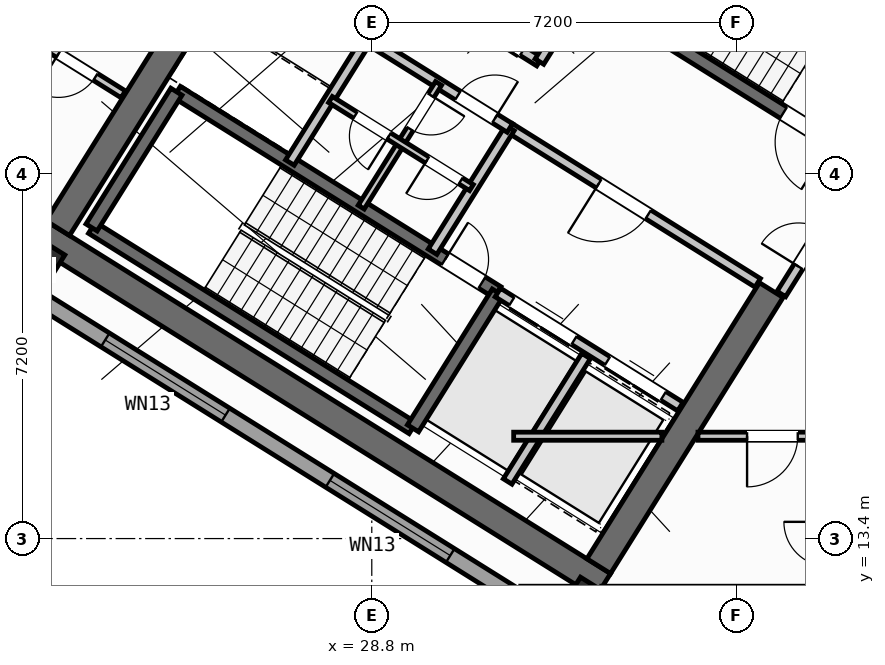
"""IFC4 building model, lengths in metres.
Left out: names, types, materials, properties, quantities, classifications, styles, units other than length and angle.
Written with IfcOpenShell. Run it as: python <this file> out.ifc"""

import sys

from ifc_helpers import new_model, si_unit, direction, frame, frame_2d, origin, origin_2d, place, context, subcontext, project, spatial, rectangle, hollow_rectangle, extrude, source, transform, mapped, element, fill, save


model = new_model("IFC4")
c1 = context("Model", 3, precision=1e-05, world=origin(), true_north=direction((0.0, 1.0)))
c2 = subcontext(c1, "Body", "Model", "MODEL_VIEW")
j1 = project(units=[si_unit("LENGTHUNIT", "METRE"), si_unit("PLANEANGLEUNIT", "RADIAN")], contexts=[c1])
p1 = place(None, origin())
s1 = spatial("IfcSite", under=j1, at=p1, CompositionType="ELEMENT")
p2 = place(p1, origin())
s2 = spatial("IfcBuilding", under=s1, at=p2, CompositionType="ELEMENT")
p3 = place(p2, frame((0.0, 0.0, 199.5)))
s3 = spatial("IfcBuildingStorey", under=s2, at=p3, CompositionType="ELEMENT", Elevation=199.5)
p4 = place(p3, frame((33.366, 12.477, 0.0), z_axis=(0.0, 0.0, 1.0), x_axis=(-0.848047359947, 0.529920442413, 0.0)))
e1 = element("IfcWall", 1, at=p4, inside=s3, PredefinedType="SHEAR", context=c2, shape_type="SweptSolid", body=[
    extrude(rectangle(XDim=13.14, YDim=0.55, at=frame_2d((6.57, 0.0))), origin(), (0.0, 0.0, 1.0), 4.25),
])
p5 = place(p3, frame((36.683, 18.304, 0.0), z_axis=(0.0, 0.0, 1.0), x_axis=(-0.529896466841, -0.848062341122, 0.0)))
e2 = element("IfcWall", 2, at=p5, inside=s3, PredefinedType="SHEAR", context=c2, shape_type="SweptSolid", body=[
    extrude(rectangle(XDim=6.425, YDim=0.55, at=frame_2d((3.212, 0.0))), origin(), (0.0, 0.0, 1.0), 4.25),
])
p6 = place(p3, frame((26.007, 24.976, 0.0), z_axis=(0.0, 0.0, 1.0), x_axis=(-0.529923795287, -0.848045264823, 0.0)))
e3 = element("IfcWall", 3, at=p6, inside=s3, PredefinedType="SHEAR", context=c2, shape_type="SweptSolid", body=[
    extrude(rectangle(XDim=6.425, YDim=0.55, at=frame_2d((3.212, 0.0))), origin(), (0.0, 0.0, 1.0), 4.25),
])
m1 = source(origin(), c2, "Body", "SweptSolid", [
    extrude(hollow_rectangle(XDim=0.8, YDim=0.8, WallThickness=0.032, at=origin_2d()), origin(), (0.0, 0.0, 1.0), 4.5),
])
for number, where, z_axis, x_axis in (
    (4, (33.046, 12.087, 0.0), (0.0, 0.0, 1.0), (-0.848, 0.53, 0.0)),
    (5, (22.191, 18.87, 0.0), (0.0, 0.0, 1.0), (-0.848, 0.53, 0.0)),
):
    element("IfcColumn", number, at=place(p3, frame(where, z_axis=z_axis, x_axis=x_axis)), inside=s3, PredefinedType="COLUMN", context=c2, shape_type="MappedRepresentation", body=[
        mapped(m1, transform((0.0, 0.0, 0.0), scale=1.0)),
    ])
p7 = place(p3, frame((31.76, 12.183, 0.0), z_axis=(0.0, 0.0, 1.0), x_axis=(-0.848047074256, 0.529920899612, 0.0)))
e6 = element("IfcWall", 6, at=p7, inside=s3, PredefinedType="STANDARD", context=c2, shape_type="SweptSolid", body=[
    extrude(rectangle(XDim=30.652, YDim=0.32, at=frame_2d((15.326, 0.0))), origin(), (0.0, 0.0, 1.0), 4.25),
])
p8 = place(p7, frame((15.166, 0.0, 0.0)))
e7 = element("IfcOpeningElement", 7, at=p8, cuts=e6, PredefinedType="OPENING", context=c2, shape_type="SweptSolid", body=[
    extrude(rectangle(XDim=1.2, YDim=2.15, at=frame_2d((0.6, 1.075))), frame((0.0, 0.17, 0.0), z_axis=(0.0, -1.0, 0.0), x_axis=(1.0, 0.0, 0.0)), (0.0, 0.0, 1.0), 0.34),
])
p9 = place(p7, frame((1.665, 0.0, 0.65)))
e8 = element("IfcOpeningElement", 8, at=p9, cuts=e6, PredefinedType="OPENING", context=c2, shape_type="SweptSolid", body=[
    extrude(rectangle(XDim=2.8, YDim=2.1, at=frame_2d((1.4, 1.05))), frame((0.0, 0.17, 0.0), z_axis=(0.0, -1.0, 0.0), x_axis=(1.0, 0.0, 0.0)), (0.0, 0.0, 1.0), 0.34),
])
p10 = place(p7, frame((6.894, 0.0, 0.65)))
e9 = element("IfcOpeningElement", 9, at=p10, cuts=e6, PredefinedType="OPENING", context=c2, shape_type="SweptSolid", body=[
    extrude(rectangle(XDim=2.8, YDim=2.1, at=frame_2d((1.4, 1.05))), frame((0.0, 0.17, 0.0), z_axis=(0.0, -1.0, 0.0), x_axis=(1.0, 0.0, 0.0)), (0.0, 0.0, 1.0), 0.34),
])
p11 = place(p7, frame((20.453, 0.0, 0.85)))
e10 = element("IfcOpeningElement", 10, at=p11, cuts=e6, PredefinedType="OPENING", context=c2, shape_type="SweptSolid", body=[
    extrude(rectangle(XDim=1.5, YDim=1.5, at=frame_2d((0.75, 0.75))), frame((0.0, 0.17, 0.0), z_axis=(0.0, -1.0, 0.0), x_axis=(1.0, 0.0, 0.0)), (0.0, 0.0, 1.0), 0.34),
])
p12 = place(p7, frame((26.258, 0.0, 0.65)))
e11 = element("IfcOpeningElement", 11, at=p12, cuts=e6, PredefinedType="OPENING", context=c2, shape_type="SweptSolid", body=[
    extrude(rectangle(XDim=2.8, YDim=2.1, at=frame_2d((1.4, 1.05))), frame((0.0, 0.17, 0.0), z_axis=(0.0, -1.0, 0.0), x_axis=(1.0, 0.0, 0.0)), (0.0, 0.0, 1.0), 0.34),
])
p13 = place(p3, frame((29.605, 15.581, 0.0), z_axis=(0.0, 0.0, 1.0), x_axis=(-0.848036911448, 0.529937163087, 0.0)))
e12 = element("IfcWall", 12, at=p13, inside=s3, PredefinedType="SHEAR", context=c2, shape_type="SweptSolid", body=[
    extrude(rectangle(XDim=7.46, YDim=0.26, at=frame_2d((3.73, 0.0))), origin(), (0.0, 0.0, 1.0), 4.25),
])
p14 = place(p3, frame((31.28, 18.261, 0.0), z_axis=(0.0, 0.0, 1.0), x_axis=(-0.848051618787, 0.529913626805, 0.0)))
e13 = element("IfcWall", 13, at=p14, inside=s3, PredefinedType="SHEAR", context=c2, shape_type="SweptSolid", body=[
    extrude(rectangle(XDim=7.46, YDim=0.26, at=frame_2d((3.73, 0.0))), origin(), (0.0, 0.0, 1.0), 4.25),
])
p15 = place(p14, frame((0.36, 0.0, 0.0)))
e14 = element("IfcOpeningElement", 14, at=p15, cuts=e13, PredefinedType="OPENING", context=c2, shape_type="SweptSolid", body=[
    extrude(rectangle(XDim=0.86, YDim=2.05, at=frame_2d((0.43, 1.025))), frame((0.0, 0.14, 0.0), z_axis=(0.0, -1.0, 0.0), x_axis=(1.0, 0.0, 0.0)), (0.0, 0.0, 1.0), 0.28),
])
p16 = place(p3, frame((31.288, 18.256, 0.0), z_axis=(0.0, 0.0, 1.0), x_axis=(-0.529943379326, -0.848033026897, 0.0)))
e15 = element("IfcWall", 15, at=p16, inside=s3, PredefinedType="SHEAR", context=c2, shape_type="SweptSolid", body=[
    extrude(rectangle(XDim=3.16, YDim=0.26, at=frame_2d((1.58, 0.0))), origin(), (0.0, 0.0, 1.0), 4.25),
])
p17 = place(p3, frame((24.945, 22.22, 0.0), z_axis=(0.0, 0.0, 1.0), x_axis=(-0.529908658664, -0.84805472316, 0.0)))
e16 = element("IfcWall", 16, at=p17, inside=s3, PredefinedType="SHEAR", context=c2, shape_type="SweptSolid", body=[
    extrude(rectangle(XDim=3.16, YDim=0.26, at=frame_2d((1.58, 0.0))), origin(), (0.0, 0.0, 1.0), 4.25),
])
p18 = place(p3, frame((38.046, 21.108, 0.0), z_axis=(0.0, 0.0, 1.0), x_axis=(-0.848054434086, 0.529909121291, 0.0)))
e17 = element("IfcWall", 17, at=p18, inside=s3, PredefinedType="SHEAR", context=c2, shape_type="SweptSolid", body=[
    extrude(rectangle(XDim=7.33, YDim=0.26, at=frame_2d((3.665, 0.0))), origin(), (0.0, 0.0, 1.0), 4.25),
])
p19 = place(p18, frame((0.22, 0.0, 0.0)))
e18 = element("IfcOpeningElement", 18, at=p19, cuts=e17, PredefinedType="OPENING", context=c2, shape_type="SweptSolid", body=[
    extrude(rectangle(XDim=1.1, YDim=2.1, at=frame_2d((0.55, 1.05))), frame((0.0, 0.14, 0.0), z_axis=(0.0, -1.0, 0.0), x_axis=(1.0, 0.0, 0.0)), (0.0, 0.0, 1.0), 0.28),
])
p20 = place(p3, frame((34.891, 16.005, 0.0), z_axis=(0.0, 0.0, 1.0), x_axis=(-0.848062873452, 0.529895614884, 0.0)))
e19 = element("IfcWall", 19, at=p20, inside=s3, PredefinedType="STANDARD", context=c2, shape_type="SweptSolid", body=[
    extrude(rectangle(XDim=4.248, YDim=0.2, at=frame_2d((2.124, 0.0))), origin(), (0.0, 0.0, 1.0), 4.24),
])
p21 = place(p20, frame((0.398, 0.0, 0.0)))
e20 = element("IfcOpeningElement", 20, at=p21, cuts=e19, PredefinedType="OPENING", context=c2, shape_type="SweptSolid", body=[
    extrude(rectangle(XDim=1.3, YDim=2.2, at=frame_2d((0.65, 1.1))), frame((0.0, 0.11, 0.0), z_axis=(0.0, -1.0, 0.0), x_axis=(1.0, 0.0, 0.0)), (0.0, 0.0, 1.0), 0.22),
])
p22 = place(p20, frame((2.473, 0.0, 0.0)))
e21 = element("IfcOpeningElement", 21, at=p22, cuts=e19, PredefinedType="OPENING", context=c2, shape_type="SweptSolid", body=[
    extrude(rectangle(XDim=1.45, YDim=2.25, at=frame_2d((0.725, 1.125))), frame((0.0, 0.11, 0.0), z_axis=(0.0, -1.0, 0.0), x_axis=(1.0, 0.0, 0.0)), (0.0, 0.0, 1.0), 0.22),
])
p23 = place(p3, frame((36.417, 18.447, 0.0), z_axis=(0.0, 0.0, 1.0), x_axis=(-0.848064879198, 0.529892404805, 0.0)))
e22 = element("IfcWall", 22, at=p23, inside=s3, PredefinedType="STANDARD", context=c2, shape_type="SweptSolid", body=[
    extrude(rectangle(XDim=5.768, YDim=0.2, at=frame_2d((2.884, 0.0))), origin(), (0.0, 0.0, 1.0), 4.24),
])
p24 = place(p23, frame((2.548, 0.0, 0.0)))
e23 = element("IfcOpeningElement", 23, at=p24, cuts=e22, PredefinedType="OPENING", context=c2, shape_type="SweptSolid", body=[
    extrude(rectangle(XDim=1.15, YDim=2.1, at=frame_2d((0.575, 1.05))), frame((0.0, 0.11, 0.0), z_axis=(0.0, -1.0, 0.0), x_axis=(1.0, 0.0, 0.0)), (0.0, 0.0, 1.0), 0.22),
])
p25 = place(p3, frame((32.108, 22.814, 0.0), z_axis=(0.0, 0.0, 1.0), x_axis=(-0.848042229521, 0.529928652696, 0.0)))
e24 = element("IfcWall", 24, at=p25, inside=s3, PredefinedType="STANDARD", context=c2, shape_type="SweptSolid", body=[
    extrude(rectangle(XDim=5.62, YDim=0.2, at=frame_2d((2.81, 0.0))), origin(), (0.0, 0.0, 1.0), 4.24),
])
p26 = place(p25, frame((0.39, 0.0, 0.0)))
e25 = element("IfcOpeningElement", 25, at=p26, cuts=e24, PredefinedType="OPENING", context=c2, shape_type="SweptSolid", body=[
    extrude(rectangle(XDim=1.1, YDim=2.15, at=frame_2d((0.55, 1.075))), frame((0.0, 0.11, 0.0), z_axis=(0.0, -1.0, 0.0), x_axis=(1.0, 0.0, 0.0)), (0.0, 0.0, 1.0), 0.22),
])
p27 = place(p25, frame((2.25, 0.0, 0.0)))
e26 = element("IfcOpeningElement", 26, at=p27, cuts=e24, PredefinedType="OPENING", context=c2, shape_type="SweptSolid", body=[
    extrude(rectangle(XDim=1.1, YDim=2.15, at=frame_2d((0.55, 1.075))), frame((0.0, 0.11, 0.0), z_axis=(0.0, -1.0, 0.0), x_axis=(1.0, 0.0, 0.0)), (0.0, 0.0, 1.0), 0.22),
])
p28 = place(p25, frame((4.11, 0.0, 0.0)))
e27 = element("IfcOpeningElement", 27, at=p28, cuts=e24, PredefinedType="OPENING", context=c2, shape_type="SweptSolid", body=[
    extrude(rectangle(XDim=1.1, YDim=2.15, at=frame_2d((0.55, 1.075))), frame((0.0, 0.11, 0.0), z_axis=(0.0, -1.0, 0.0), x_axis=(1.0, 0.0, 0.0)), (0.0, 0.0, 1.0), 0.22),
])
p29 = place(p3, frame((32.982, 24.213, 0.0), z_axis=(0.0, 0.0, 1.0), x_axis=(-0.529839334948, -0.84809803628, 0.0)))
e28 = element("IfcWall", 28, at=p29, inside=s3, PredefinedType="STANDARD", context=c2, shape_type="SweptSolid", body=[
    extrude(rectangle(XDim=1.65, YDim=0.2, at=frame_2d((0.825, 0.0))), origin(), (0.0, 0.0, 1.0), 4.24),
])
p30 = place(p3, frame((33.029, 17.003, 0.0), z_axis=(0.0, 0.0, 1.0), x_axis=(-0.529916267533, -0.848049968695, 0.0)))
e29 = element("IfcWall", 29, at=p30, inside=s3, PredefinedType="STANDARD", context=c2, shape_type="SweptSolid", body=[
    extrude(rectangle(XDim=2.92, YDim=0.2, at=frame_2d((1.46, 0.0))), origin(), (0.0, 0.0, 1.0), 4.24),
])
for number, where, z_axis, x_axis in (
    (30, (31.525, 21.504, 0.0), (0.0, 0.0, 1.0), (-0.53, -0.848, 0.0)),
    (31, (28.71, 23.263, 0.0), (0.0, 0.0, 1.0), (-0.53, -0.848, 0.0)),
):
    element("IfcWall", number, at=place(p3, frame(where, z_axis=z_axis, x_axis=x_axis)), inside=s3, PredefinedType="STANDARD", context=c2, shape_type="SweptSolid", body=[
        extrude(rectangle(XDim=2.88, YDim=0.2, at=frame_2d((1.44, 0.0))), origin(), (0.0, 0.0, 1.0), 4.24),
    ])
p31 = place(p3, frame((31.525, 21.504, 0.0), z_axis=(0.0, 0.0, 1.0), x_axis=(-0.848040211232, 0.529931882541, 0.0)))
e32 = element("IfcWall", 32, at=p31, inside=s3, PredefinedType="STANDARD", context=c2, shape_type="SweptSolid", body=[
    extrude(rectangle(XDim=6.218, YDim=0.2, at=frame_2d((3.109, 0.0))), origin(), (0.0, 0.0, 1.0), 4.24),
])
p32 = place(p31, frame((4.4, 0.0, 0.0)))
e33 = element("IfcOpeningElement", 33, at=p32, cuts=e32, PredefinedType="OPENING", context=c2, shape_type="SweptSolid", body=[
    extrude(rectangle(XDim=0.86, YDim=2.05, at=frame_2d((0.43, 1.025))), frame((0.0, 0.11, 0.0), z_axis=(0.0, -1.0, 0.0), x_axis=(1.0, 0.0, 0.0)), (0.0, 0.0, 1.0), 0.22),
])
p33 = place(p31, frame((0.35, 0.0, 0.0)))
e34 = element("IfcOpeningElement", 34, at=p33, cuts=e32, PredefinedType="OPENING", context=c2, shape_type="SweptSolid", body=[
    extrude(rectangle(XDim=0.86, YDim=2.05, at=frame_2d((0.43, 1.025))), frame((0.0, 0.11, 0.0), z_axis=(0.0, -1.0, 0.0), x_axis=(1.0, 0.0, 0.0)), (0.0, 0.0, 1.0), 0.22),
])
p34 = place(p3, frame((30.117, 22.384, 0.0), z_axis=(0.0, 0.0, 1.0), x_axis=(-0.529951914384, -0.848027693204, 0.0)))
e35 = element("IfcWall", 35, at=p34, inside=s3, PredefinedType="PLUMBINGWALL", context=c2, shape_type="SweptSolid", body=[
    extrude(rectangle(XDim=1.4, YDim=0.14, at=frame_2d((0.7, 0.0))), origin(), (0.0, 0.0, 1.0), 4.24),
])
p35 = place(p34, frame((0.28, 0.0, 0.0)))
e36 = element("IfcOpeningElement", 36, at=p35, cuts=e35, PredefinedType="OPENING", context=c2, shape_type="SweptSolid", body=[
    extrude(rectangle(XDim=0.78, YDim=2.05, at=frame_2d((0.39, 1.025))), frame((0.0, 0.08, 0.0), z_axis=(0.0, -1.0, 0.0), x_axis=(1.0, 0.0, 0.0)), (0.0, 0.0, 1.0), 0.16),
])
p36 = place(p3, frame((29.375, 21.196, 0.0), z_axis=(0.0, 0.0, 1.0), x_axis=(-0.529865479138, -0.848081702443, 0.0)))
e37 = element("IfcWall", 37, at=p36, inside=s3, PredefinedType="PLUMBINGWALL", context=c2, shape_type="SweptSolid", body=[
    extrude(rectangle(XDim=1.48, YDim=0.14, at=frame_2d((0.74, 0.0))), origin(), (0.0, 0.0, 1.0), 4.24),
])
p37 = place(p3, frame((30.766, 20.327, 0.0), z_axis=(0.0, 0.0, 1.0), x_axis=(-0.848052663127, 0.529911955482, 0.0)))
e38 = element("IfcWall", 38, at=p37, inside=s3, PredefinedType="PLUMBINGWALL", context=c2, shape_type="SweptSolid", body=[
    extrude(rectangle(XDim=3.28, YDim=0.14, at=frame_2d((1.64, 0.0))), origin(), (0.0, 0.0, 1.0), 4.24),
])
p38 = place(p37, frame((0.25, 0.0, 0.0)))
e39 = element("IfcOpeningElement", 39, at=p38, cuts=e38, PredefinedType="OPENING", context=c2, shape_type="SweptSolid", body=[
    extrude(rectangle(XDim=0.78, YDim=2.05, at=frame_2d((0.39, 1.025))), frame((0.0, 0.08, 0.0), z_axis=(0.0, -1.0, 0.0), x_axis=(1.0, 0.0, 0.0)), (0.0, 0.0, 1.0), 0.16),
])
p39 = place(p37, frame((1.92, 0.0, 0.0)))
e40 = element("IfcOpeningElement", 40, at=p39, cuts=e38, PredefinedType="OPENING", context=c2, shape_type="SweptSolid", body=[
    extrude(rectangle(XDim=0.78, YDim=2.05, at=frame_2d((0.39, 1.025))), frame((0.0, 0.08, 0.0), z_axis=(0.0, -1.0, 0.0), x_axis=(1.0, 0.0, 0.0)), (0.0, 0.0, 1.0), 0.16),
])
p40 = place(p3, frame((23.896, 22.168, 0.0), z_axis=(0.0, 0.0, 1.0), x_axis=(-0.848075553449, 0.529875320846, 0.0)))
e41 = element("IfcWall", 41, at=p40, inside=s3, PredefinedType="PARTITIONING", context=c2, shape_type="SweptSolid", body=[
    extrude(rectangle(XDim=2.308, YDim=0.16, at=frame_2d((1.154, 0.0))), origin(), (0.0, 0.0, 1.0), 4.24),
])
p41 = place(p40, frame((0.648, 0.0, 0.0)))
e42 = element("IfcOpeningElement", 42, at=p41, cuts=e41, PredefinedType="OPENING", context=c2, shape_type="SweptSolid", body=[
    extrude(rectangle(XDim=0.86, YDim=2.05, at=frame_2d((0.43, 1.025))), frame((0.0, 0.09, 0.0), z_axis=(0.0, -1.0, 0.0), x_axis=(1.0, 0.0, 0.0)), (0.0, 0.0, 1.0), 0.18),
])
p42 = place(p3, frame((38.451, 20.737, 0.0), z_axis=(0.0, 0.0, 1.0), x_axis=(-0.529924799939, -0.848044637038, 0.0)))
e43 = element("IfcWall", 43, at=p42, inside=s3, PredefinedType="STANDARD", context=c2, shape_type="SweptSolid", body=[
    extrude(rectangle(XDim=2.96, YDim=0.2, at=frame_2d((1.48, 0.0))), origin(), (0.0, 0.0, 1.0), 4.24),
])
p43 = place(p42, frame((1.46, 0.0, 0.0)))
e44 = element("IfcOpeningElement", 44, at=p43, cuts=e43, PredefinedType="OPENING", context=c2, shape_type="SweptSolid", body=[
    extrude(rectangle(XDim=0.86, YDim=2.05, at=frame_2d((0.43, 1.025))), frame((0.0, 0.11, 0.0), z_axis=(0.0, -1.0, 0.0), x_axis=(1.0, 0.0, 0.0)), (0.0, 0.0, 1.0), 0.22),
])
p44 = place(p3, frame((31.6, 15.42, 0.0), z_axis=(0.0, 0.0, 1.0), x_axis=(1.0, 0.0, 0.0)))
e45 = element("IfcWall", 45, at=p44, inside=s3, PredefinedType="PARTITIONING", context=c2, shape_type="SweptSolid", body=[
    extrude(rectangle(XDim=2.925, YDim=0.16, at=frame_2d((1.462, 0.0))), origin(), (0.0, 0.0, 1.0), 4.24),
])
p45 = place(p3, frame((35.237, 15.42, 0.0), z_axis=(0.0, 0.0, 1.0), x_axis=(1.0, 0.0, 0.0)))
e46 = element("IfcWall", 46, at=p45, inside=s3, PredefinedType="PARTITIONING", context=c2, shape_type="SweptSolid", body=[
    extrude(rectangle(XDim=15.432, YDim=0.16, at=frame_2d((7.716, 0.0))), origin(), (0.0, 0.0, 1.0), 4.24),
])
p46 = place(p45, frame((0.969, 0.0, 0.0)))
e47 = element("IfcOpeningElement", 47, at=p46, cuts=e46, PredefinedType="OPENING", context=c2, shape_type="SweptSolid", body=[
    extrude(rectangle(XDim=1.0, YDim=2.1, at=frame_2d((0.5, 1.05))), frame((0.0, 0.09, 0.0), z_axis=(0.0, -1.0, 0.0), x_axis=(1.0, 0.0, 0.0)), (0.0, 0.0, 1.0), 0.18),
])
p47 = place(p45, frame((8.799, 0.0, 0.0)))
e48 = element("IfcOpeningElement", 48, at=p47, cuts=e46, PredefinedType="OPENING", context=c2, shape_type="SweptSolid", body=[
    extrude(rectangle(XDim=1.0, YDim=2.1, at=frame_2d((0.5, 1.05))), frame((0.0, 0.09, 0.0), z_axis=(0.0, -1.0, 0.0), x_axis=(1.0, 0.0, 0.0)), (0.0, 0.0, 1.0), 0.18),
])
m2 = source(origin(), c2, "Body", "SweptSolid", [
    extrude(rectangle(XDim=2.8, YDim=2.1, at=frame_2d((1.4, 1.05))), frame((0.0, 0.03, 0.0), z_axis=(0.0, -1.0, 0.0), x_axis=(1.0, 0.0, 0.0)), (0.0, 0.0, 1.0), 0.06),
])
p48 = place(p9, origin())
e49 = element("IfcWindow", 49, at=p48, inside=s3, PartitioningType="SINGLE_PANEL", PredefinedType="WINDOW", context=c2, shape_type="MappedRepresentation", body=[
    mapped(m2, transform((0.0, 0.0, 0.0), scale=1.0)),
])
fill(e8, e49)
p49 = place(p10, origin())
e50 = element("IfcWindow", 50, at=p49, inside=s3, PartitioningType="SINGLE_PANEL", PredefinedType="WINDOW", context=c2, shape_type="MappedRepresentation", body=[
    mapped(m2, transform((0.0, 0.0, 0.0), scale=1.0)),
])
fill(e9, e50)
m3 = source(origin(), c2, "Body", "SweptSolid", [
    extrude(rectangle(XDim=0.86, YDim=2.05, at=frame_2d((0.43, 1.025))), frame((0.0, 0.025, 0.0), z_axis=(0.0, -1.0, 0.0), x_axis=(1.0, 0.0, 0.0)), (0.0, 0.0, 1.0), 0.05),
])
p50 = place(p15, frame((0.86, 0.0, 0.0), z_axis=(0.0, 0.0, 1.0), x_axis=(-1.0, 0.0, 0.0)))
e51 = element("IfcDoor", 51, at=p50, inside=s3, OperationType="SINGLE_SWING_LEFT", PredefinedType="DOOR", context=c2, shape_type="MappedRepresentation", body=[
    mapped(m3, transform((0.0, 0.0, 0.0), scale=1.0)),
])
fill(e14, e51)
m4 = source(origin(), c2, "Body", "SweptSolid", [
    extrude(rectangle(XDim=1.1, YDim=2.1, at=frame_2d((0.55, 1.05))), frame((0.0, 0.025, 0.0), z_axis=(0.0, -1.0, 0.0), x_axis=(1.0, 0.0, 0.0)), (0.0, 0.0, 1.0), 0.05),
])
p51 = place(p19, origin())
e52 = element("IfcDoor", 52, at=p51, inside=s3, OperationType="SINGLE_SWING_LEFT", PredefinedType="DOOR", context=c2, shape_type="MappedRepresentation", body=[
    mapped(m4, transform((0.0, 0.0, 0.0), scale=1.0)),
])
fill(e18, e52)
m5 = source(origin(), c2, "Body", "SweptSolid", [
    extrude(rectangle(XDim=1.15, YDim=2.1, at=frame_2d((0.575, 1.05))), frame((0.0, 0.025, 0.0), z_axis=(0.0, -1.0, 0.0), x_axis=(1.0, 0.0, 0.0)), (0.0, 0.0, 1.0), 0.05),
])
p52 = place(p24, origin())
e53 = element("IfcDoor", 53, at=p52, inside=s3, OperationType="SINGLE_SWING_RIGHT", PredefinedType="DOOR", context=c2, shape_type="MappedRepresentation", body=[
    mapped(m5, transform((0.0, 0.0, 0.0), scale=1.0)),
])
fill(e23, e53)
m6 = source(origin(), c2, "Body", "SweptSolid", [
    extrude(rectangle(XDim=1.3, YDim=2.2, at=frame_2d((0.65, 1.1))), frame((0.0, 0.025, 0.0), z_axis=(0.0, -1.0, 0.0), x_axis=(1.0, 0.0, 0.0)), (0.0, 0.0, 1.0), 0.05),
])
p53 = place(p21, origin())
e54 = element("IfcDoor", 54, at=p53, inside=s3, OperationType="DOUBLE_DOOR_SLIDING", PredefinedType="DOOR", context=c2, shape_type="MappedRepresentation", body=[
    mapped(m6, transform((0.0, 0.0, 0.0), scale=1.0)),
])
fill(e20, e54)
m7 = source(origin(), c2, "Body", "SweptSolid", [
    extrude(rectangle(XDim=1.45, YDim=2.25, at=frame_2d((0.725, 1.125))), frame((0.0, 0.025, 0.0), z_axis=(0.0, -1.0, 0.0), x_axis=(1.0, 0.0, 0.0)), (0.0, 0.0, 1.0), 0.05),
])
p54 = place(p22, origin())
e55 = element("IfcDoor", 55, at=p54, inside=s3, OperationType="DOUBLE_DOOR_SLIDING", PredefinedType="DOOR", context=c2, shape_type="MappedRepresentation", body=[
    mapped(m7, transform((0.0, 0.0, 0.0), scale=1.0)),
])
fill(e21, e55)
p55 = place(p33, frame((0.86, 0.0, 0.0), z_axis=(0.0, 0.0, 1.0), x_axis=(-1.0, 0.0, 0.0)))
e56 = element("IfcDoor", 56, at=p55, inside=s3, OperationType="SINGLE_SWING_RIGHT", PredefinedType="DOOR", context=c2, shape_type="MappedRepresentation", body=[
    mapped(m3, transform((0.0, 0.0, 0.0), scale=1.0)),
])
fill(e34, e56)
m8 = source(origin(), c2, "Body", "SweptSolid", [
    extrude(rectangle(XDim=0.78, YDim=2.05, at=frame_2d((0.39, 1.025))), frame((0.0, 0.025, 0.0), z_axis=(0.0, -1.0, 0.0), x_axis=(1.0, 0.0, 0.0)), (0.0, 0.0, 1.0), 0.05),
])
p56 = place(p35, origin())
e57 = element("IfcDoor", 57, at=p56, inside=s3, OperationType="SINGLE_SWING_LEFT", PredefinedType="DOOR", context=c2, shape_type="MappedRepresentation", body=[
    mapped(m8, transform((0.0, 0.0, 0.0), scale=1.0)),
])
fill(e36, e57)
p57 = place(p38, origin())
e58 = element("IfcDoor", 58, at=p57, inside=s3, OperationType="SINGLE_SWING_RIGHT", PredefinedType="DOOR", context=c2, shape_type="MappedRepresentation", body=[
    mapped(m8, transform((0.0, 0.0, 0.0), scale=1.0)),
])
fill(e39, e58)
p58 = place(p39, origin())
e59 = element("IfcDoor", 59, at=p58, inside=s3, OperationType="SINGLE_SWING_LEFT", PredefinedType="DOOR", context=c2, shape_type="MappedRepresentation", body=[
    mapped(m8, transform((0.0, 0.0, 0.0), scale=1.0)),
])
fill(e40, e59)
p59 = place(p41, origin())
e60 = element("IfcDoor", 60, at=p59, inside=s3, OperationType="SINGLE_SWING_RIGHT", PredefinedType="DOOR", context=c2, shape_type="MappedRepresentation", body=[
    mapped(m3, transform((0.0, 0.0, 0.0), scale=1.0)),
])
fill(e42, e60)
p60 = place(p43, frame((0.86, 0.0, 0.0), z_axis=(0.0, 0.0, 1.0), x_axis=(-1.0, 0.0, 0.0)))
e61 = element("IfcDoor", 61, at=p60, inside=s3, OperationType="SINGLE_SWING_LEFT", PredefinedType="DOOR", context=c2, shape_type="MappedRepresentation", body=[
    mapped(m3, transform((0.0, 0.0, 0.0), scale=1.0)),
])
fill(e44, e61)
m9 = source(origin(), c2, "Body", "SweptSolid", [
    extrude(rectangle(XDim=1.0, YDim=2.1, at=frame_2d((0.5, 1.05))), frame((0.0, 0.025, 0.0), z_axis=(0.0, -1.0, 0.0), x_axis=(1.0, 0.0, 0.0)), (0.0, 0.0, 1.0), 0.05),
])
p61 = place(p46, frame((1.0, 0.0, 0.0), z_axis=(0.0, 0.0, 1.0), x_axis=(-1.0, 0.0, 0.0)))
e62 = element("IfcDoor", 62, at=p61, inside=s3, OperationType="SINGLE_SWING_RIGHT", PredefinedType="DOOR", context=c2, shape_type="MappedRepresentation", body=[
    mapped(m9, transform((0.0, 0.0, 0.0), scale=1.0)),
])
fill(e47, e62)
save(model, sys.argv[1])
